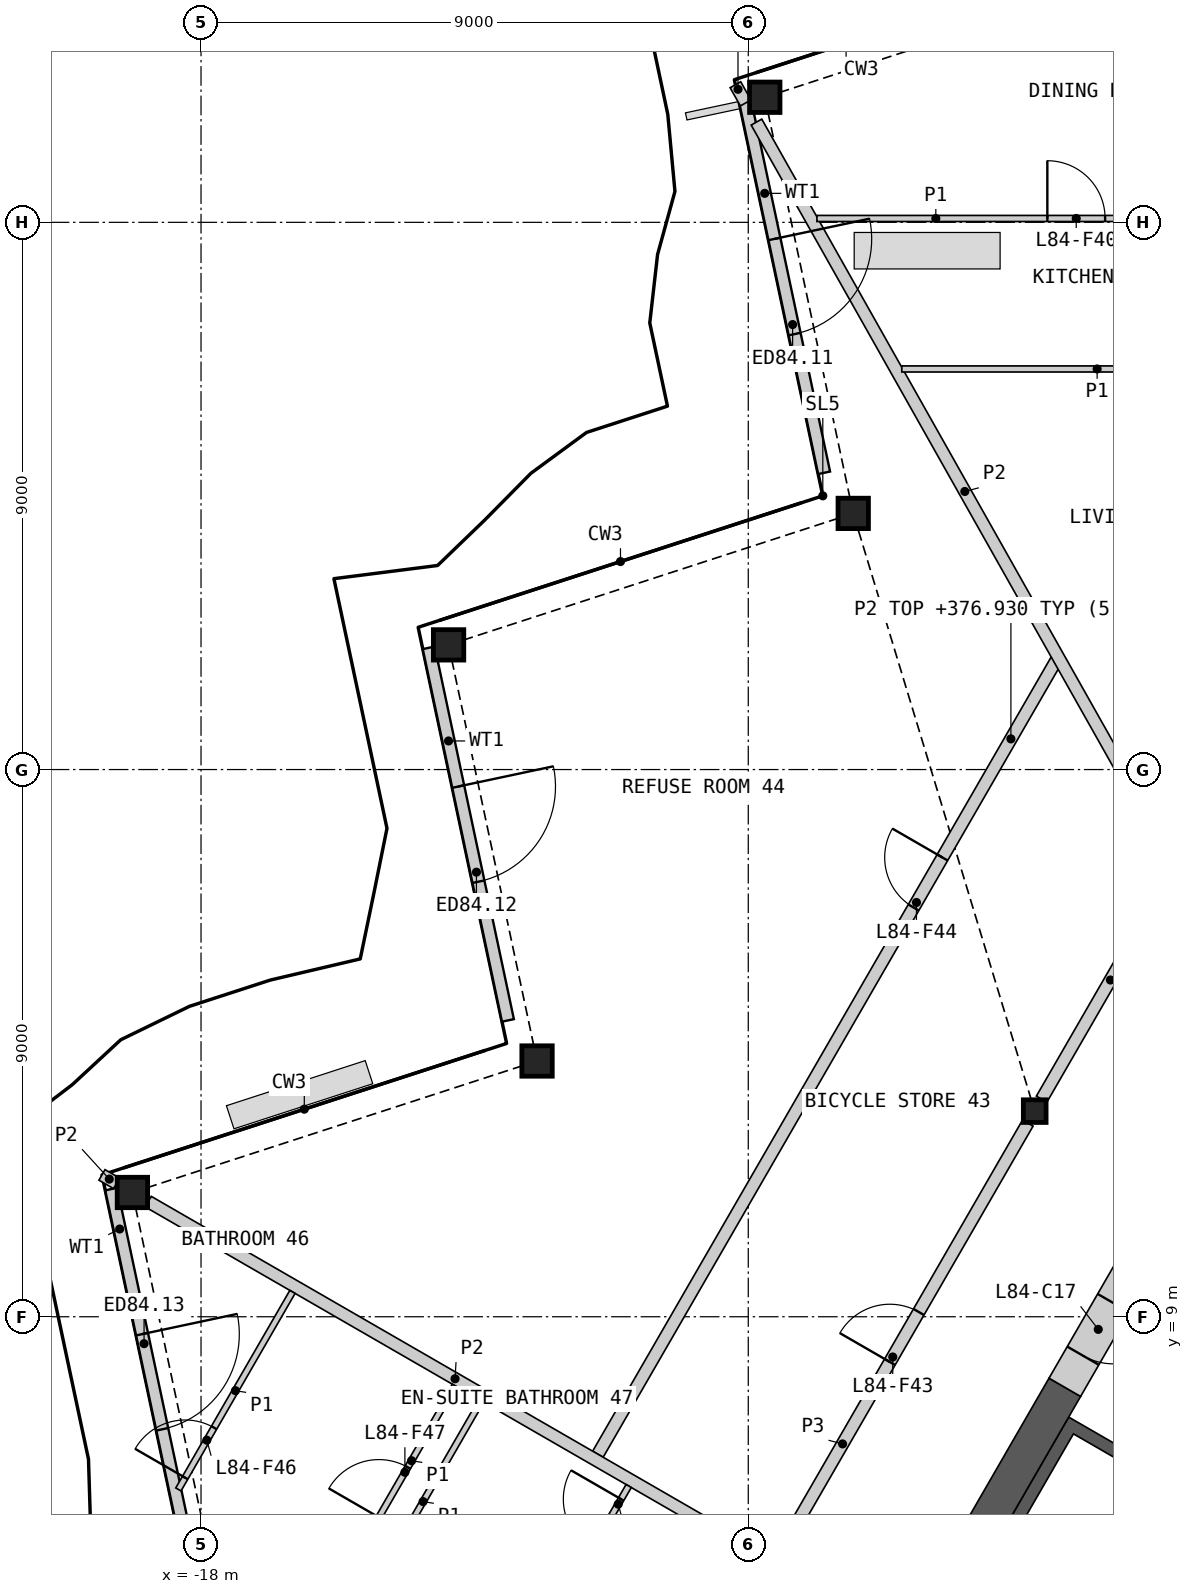
"""IFC4 building model, lengths in metres.
Left out: names, types, materials, properties, quantities, classifications, styles, units other than length and angle.
Written with IfcOpenShell. Run it as: python <this file> out.ifc"""

import sys

from ifc_helpers import new_model, si_unit, direction, frame, frame_2d, origin, origin_2d, place, context, subcontext, project, spatial, polyline, rectangle, hollow_rectangle, i_section, outline, extrude, element, fill, save


model = new_model("IFC4")
c1 = context("Model", 3, precision=1e-05, world=origin(), true_north=direction((0.0, 1.0)))
c2 = subcontext(c1, "Body", "Model", "MODEL_VIEW")
j1 = project(units=[si_unit("LENGTHUNIT", "METRE"), si_unit("PLANEANGLEUNIT", "RADIAN")], contexts=[c1])
p1 = place(None, origin())
s1 = spatial("IfcSite", under=j1, at=p1, CompositionType="ELEMENT")
p2 = place(p1, origin())
s2 = spatial("IfcBuilding", under=s1, at=p2, CompositionType="ELEMENT")
p3 = place(p2, frame((0.0, 0.0, 374.6)))
s3 = spatial("IfcBuildingStorey", under=s2, at=p3, CompositionType="ELEMENT", Elevation=374.6)
for number, where, z_axis, x_axis in (
    (1, (-8.729, 29.057, 0.0), (0.0, 0.0, 1.0), (1.0, 0.0, 0.0)),
    (2, (-7.274, 22.213, 0.0), (0.0, 0.0, 1.0), (1.0, 0.0, 0.0)),
    (3, (-13.929, 20.051, 0.0), (0.0, 0.0, 1.0), (1.0, 0.0, 0.0)),
    (4, (-12.474, 13.206, 0.0), (0.0, 0.0, 1.0), (1.0, 0.0, 0.0)),
    (5, (-19.129, 11.044, 0.0), (0.0, 0.0, 1.0), (1.0, 0.0, 0.0)),
):
    element("IfcColumn", number, at=place(p3, frame(where, z_axis=z_axis, x_axis=x_axis)), inside=s3, PredefinedType="COLUMN", context=c2, shape_type="SweptSolid", body=[
        extrude(hollow_rectangle(XDim=0.5, YDim=0.5, WallThickness=0.03, at=origin_2d()), origin(), (0.0, 0.0, 1.0), 3.4),
    ])
p4 = place(p3, frame((-4.289, 12.382, 0.0), z_axis=(0.0, 0.0, 1.0), x_axis=(1.0, 0.0, 0.0)))
e6 = element("IfcColumn", 6, at=p4, inside=s3, PredefinedType="COLUMN", context=c2, shape_type="SweptSolid", body=[
    extrude(i_section(OverallWidth=0.374, OverallDepth=0.372, WebThickness=0.016, FlangeThickness=0.026, at=origin_2d()), origin(), (0.0, 0.0, 1.0), 3.4),
])
p5 = place(p3, frame((-9.055, 29.009, 0.0), z_axis=(0.0, 0.0, 1.0), x_axis=(0.207926797195, -0.978144389652, 0.0)))
e7 = element("IfcWall", 7, at=p5, inside=s3, PredefinedType="SOLIDWALL", context=c2, shape_type="SweptSolid", body=[
    extrude(rectangle(XDim=6.265, YDim=0.2, at=frame_2d((3.133, 0.0))), origin(), (0.0, 0.0, 1.0), 2.634),
])
p6 = place(p5, frame((2.333, 0.0, 0.0)))
e8 = element("IfcOpeningElement", 8, at=p6, cuts=e7, PredefinedType="OPENING", context=c2, shape_type="SweptSolid", body=[
    extrude(rectangle(XDim=1.6, YDim=2.25, at=frame_2d((0.8, 1.125))), frame((0.0, 0.11, 0.0), z_axis=(0.0, -1.0, 0.0), x_axis=(1.0, 0.0, 0.0)), (0.0, 0.0, 1.0), 0.22),
])
p7 = place(p3, frame((-14.255, 20.002, 0.0), z_axis=(0.0, 0.0, 1.0), x_axis=(0.207926797195, -0.978144389652, 0.0)))
e9 = element("IfcWall", 9, at=p7, inside=s3, PredefinedType="SOLIDWALL", context=c2, shape_type="SweptSolid", body=[
    extrude(rectangle(XDim=6.265, YDim=0.2, at=frame_2d((3.133, 0.0))), origin(), (0.0, 0.0, 1.0), 2.634),
])
p8 = place(p7, frame((2.333, 0.0, 0.0)))
e10 = element("IfcOpeningElement", 10, at=p8, cuts=e9, PredefinedType="OPENING", context=c2, shape_type="SweptSolid", body=[
    extrude(rectangle(XDim=1.6, YDim=2.25, at=frame_2d((0.8, 1.125))), frame((0.0, 0.11, 0.0), z_axis=(0.0, -1.0, 0.0), x_axis=(1.0, 0.0, 0.0)), (0.0, 0.0, 1.0), 0.22),
])
p9 = place(p3, frame((-19.477, 11.1, 0.0), z_axis=(0.0, 0.0, 1.0), x_axis=(0.207910061304, -0.978147947096, 0.0)))
e11 = element("IfcWall", 11, at=p9, inside=s3, PredefinedType="SOLIDWALL", context=c2, shape_type="SweptSolid", body=[
    extrude(rectangle(XDim=6.716, YDim=0.2, at=frame_2d((3.358, 0.0))), origin(), (0.0, 0.0, 1.0), 2.634),
])
p10 = place(p9, frame((2.439, 0.0, 0.0)))
e12 = element("IfcOpeningElement", 12, at=p10, cuts=e11, PredefinedType="OPENING", context=c2, shape_type="SweptSolid", body=[
    extrude(rectangle(XDim=1.6, YDim=2.25, at=frame_2d((0.8, 1.125))), frame((0.0, 0.11, 0.0), z_axis=(0.0, -1.0, 0.0), x_axis=(1.0, 0.0, 0.0)), (0.0, 0.0, 1.0), 0.22),
])
p11 = place(p3, origin())
e13 = element("IfcWall", 13, at=p11, inside=s3, PredefinedType="SHEAR", context=c2, shape_type="SweptSolid", body=[
    extrude(outline(polyline([(-4.96, 0.208), (-7.131, 1.461), (-3.731, 7.35), (-1.561, 6.097), (-1.66, 5.924), (-3.652, 7.074), (-6.852, 1.531), (-4.861, 0.381), (-4.96, 0.208)])), origin(), (0.0, 0.0, 1.0), 3.1),
])
p12 = place(p3, frame((-1.631, 5.776, 0.0), z_axis=(0.0, 0.0, 1.0), x_axis=(-0.499992876559, -0.866029516466, 0.0)))
e14 = element("IfcWall", 14, at=p12, inside=s3, PredefinedType="SOLIDWALL", context=c2, shape_type="SweptSolid", body=[
    extrude(rectangle(XDim=6.486, YDim=0.2, at=frame_2d((3.243, 0.0))), origin(), (0.0, 0.0, 1.0), 3.1),
])
p13 = place(p12, frame((2.637, 0.0, 0.0)))
e15 = element("IfcOpeningElement", 15, at=p13, cuts=e14, PredefinedType="OPENING", context=c2, shape_type="SweptSolid", body=[
    extrude(rectangle(XDim=0.9, YDim=2.1, at=frame_2d((0.45, 1.05))), frame((0.0, 0.11, 0.0), z_axis=(0.0, -1.0, 0.0), x_axis=(1.0, 0.0, 0.0)), (0.0, 0.0, 1.0), 0.22),
])
p14 = place(p3, frame((-3.794, 7.84, 0.0), z_axis=(0.0, 0.0, 1.0), x_axis=(-0.499974747889, -0.866039982607, 0.0)))
e16 = element("IfcWall", 16, at=p14, inside=s3, PredefinedType="SHEAR", context=c2, shape_type="SweptSolid", body=[
    extrude(rectangle(XDim=7.092, YDim=0.6, at=frame_2d((3.546, 0.0))), origin(), (0.0, 0.0, 1.0), 3.1),
])
p15 = place(p3, frame((-2.694, 9.745, 0.0), z_axis=(0.0, 0.0, 1.0), x_axis=(-0.50002983664, -0.866008176907, 0.0)))
e17 = element("IfcWall", 17, at=p15, inside=s3, PredefinedType="SHEAR", context=c2, shape_type="SweptSolid", body=[
    extrude(rectangle(XDim=2.2, YDim=0.6, at=frame_2d((1.1, 0.0))), origin(), (0.0, 0.0, 1.0), 3.1),
])
p16 = place(p15, frame((0.6, 0.0, 0.0)))
e18 = element("IfcOpeningElement", 18, at=p16, cuts=e17, PredefinedType="OPENING", context=c2, shape_type="SweptSolid", body=[
    extrude(rectangle(XDim=1.0, YDim=2.1, at=frame_2d((0.5, 1.05))), frame((0.0, 0.31, 0.0), z_axis=(0.0, -1.0, 0.0), x_axis=(1.0, 0.0, 0.0)), (0.0, 0.0, 1.0), 0.62),
])
p17 = place(p3, frame((-8.465, 5.15, 0.0), z_axis=(0.0, 0.0, 1.0), x_axis=(0.499992155518, 0.866029932751, 0.0)))
e19 = element("IfcWall", 19, at=p17, inside=s3, PredefinedType="PARTITIONING", context=c2, shape_type="SweptSolid", body=[
    extrude(rectangle(XDim=8.123, YDim=0.2, at=frame_2d((4.062, 0.0))), origin(), (0.0, 0.0, 1.0), 3.1),
])
p18 = place(p17, frame((3.587, 0.0, 0.0)))
e20 = element("IfcOpeningElement", 20, at=p18, cuts=e19, PredefinedType="OPENING", context=c2, shape_type="SweptSolid", body=[
    extrude(rectangle(XDim=0.95, YDim=2.1, at=frame_2d((0.475, 1.05))), frame((0.0, 0.11, 0.0), z_axis=(0.0, -1.0, 0.0), x_axis=(1.0, 0.0, 0.0)), (0.0, 0.0, 1.0), 0.22),
])
p19 = place(p3, frame((-4.176, 12.579, 0.0), z_axis=(0.0, 0.0, 1.0), x_axis=(0.499974648164, 0.866040040179, 0.0)))
e21 = element("IfcWall", 21, at=p19, inside=s3, PredefinedType="PARTITIONING", context=c2, shape_type="SweptSolid", body=[
    extrude(rectangle(XDim=4.525, YDim=0.2, at=frame_2d((2.263, 0.0))), origin(), (0.0, 0.0, 1.0), 3.1),
])
p20 = place(p3, frame((-11.473, 6.74, 0.0), z_axis=(0.0, 0.0, 1.0), x_axis=(0.500001082559, 0.866024778768, 0.0)))
e22 = element("IfcWall", 22, at=p20, inside=s3, PredefinedType="PARTITIONING", context=c2, shape_type="SweptSolid", body=[
    extrude(rectangle(XDim=15.094, YDim=0.2, at=frame_2d((7.547, 0.0))), origin(), (0.0, 0.0, 1.0), 2.33),
])
p21 = place(p20, frame((10.383, 0.0, 0.0)))
e23 = element("IfcOpeningElement", 23, at=p21, cuts=e22, PredefinedType="OPENING", context=c2, shape_type="SweptSolid", body=[
    extrude(rectangle(XDim=0.95, YDim=2.1, at=frame_2d((0.475, 1.05))), frame((0.0, 0.11, 0.0), z_axis=(0.0, -1.0, 0.0), x_axis=(1.0, 0.0, 0.0)), (0.0, 0.0, 1.0), 0.22),
])
p22 = place(p3, frame((-8.865, 28.649, 0.0), z_axis=(0.0, 0.0, 1.0), x_axis=(0.491236420263, -0.871026279401, 0.0)))
e24 = element("IfcWall", 24, at=p22, inside=s3, PredefinedType="PARTITIONING", context=c2, shape_type="SweptSolid", body=[
    extrude(rectangle(XDim=13.95, YDim=0.2, at=frame_2d((6.975, 0.0))), origin(), (0.0, 0.0, 1.0), 2.33),
])
p23 = place(p3, frame((-18.869, 10.894, 0.0), z_axis=(0.0, 0.0, 1.0), x_axis=(0.866023724155, -0.500002909193, 0.0)))
e25 = element("IfcWall", 25, at=p23, inside=s3, PredefinedType="PARTITIONING", context=c2, shape_type="SweptSolid", body=[
    extrude(rectangle(XDim=11.655, YDim=0.2, at=frame_2d((5.827, 0.0))), origin(), (0.0, 0.0, 1.0), 2.33),
])
p24 = place(p3, frame((-9.211, 29.263, 0.0), z_axis=(0.0, 0.0, 1.0), x_axis=(0.4910719836, -0.871118996994, 0.0)))
e26 = element("IfcWall", 26, at=p24, inside=s3, PredefinedType="PARTITIONING", context=c2, shape_type="SweptSolid", body=[
    extrude(rectangle(XDim=0.343, YDim=0.2, at=frame_2d((0.171, 0.0))), origin(), (0.0, 0.0, 1.0), 2.33),
])
p25 = place(p3, frame((-19.629, 11.333, 0.0), z_axis=(0.0, 0.0, 1.0), x_axis=(0.866068339032, -0.499925626596, 0.0)))
e27 = element("IfcWall", 27, at=p25, inside=s3, PredefinedType="PARTITIONING", context=c2, shape_type="SweptSolid", body=[
    extrude(rectangle(XDim=0.277, YDim=0.2, at=frame_2d((0.139, 0.0))), origin(), (0.0, 0.0, 1.0), 2.33),
])
p26 = place(p3, frame((-7.871, 27.064, 0.0), z_axis=(0.0, 0.0, 1.0), x_axis=(1.0, 0.0, 0.0)))
e28 = element("IfcWall", 28, at=p26, inside=s3, PredefinedType="PARTITIONING", context=c2, shape_type="SweptSolid", body=[
    extrude(rectangle(XDim=7.821, YDim=0.1, at=frame_2d((3.91, 0.0))), origin(), (0.0, 0.0, 1.0), 2.33),
])
p27 = place(p26, frame((3.789, 0.0, 0.0)))
e29 = element("IfcOpeningElement", 29, at=p27, cuts=e28, PredefinedType="OPENING", context=c2, shape_type="SweptSolid", body=[
    extrude(rectangle(XDim=0.95, YDim=2.1, at=frame_2d((0.475, 1.05))), frame((0.0, 0.06, 0.0), z_axis=(0.0, -1.0, 0.0), x_axis=(1.0, 0.0, 0.0)), (0.0, 0.0, 1.0), 0.12),
])
p28 = place(p3, frame((-6.475, 24.589, 0.0), z_axis=(0.0, 0.0, 1.0), x_axis=(1.0, 0.0, 0.0)))
e30 = element("IfcWall", 30, at=p28, inside=s3, PredefinedType="PARTITIONING", context=c2, shape_type="SweptSolid", body=[
    extrude(rectangle(XDim=6.425, YDim=0.1, at=frame_2d((3.212, 0.0))), origin(), (0.0, 0.0, 1.0), 2.33),
])
p29 = place(p28, frame((3.499, 0.0, 0.0)))
e31 = element("IfcOpeningElement", 31, at=p29, cuts=e30, PredefinedType="OPENING", context=c2, shape_type="SweptSolid", body=[
    extrude(rectangle(XDim=0.95, YDim=2.1, at=frame_2d((0.475, 1.05))), frame((0.0, 0.06, 0.0), z_axis=(0.0, -1.0, 0.0), x_axis=(1.0, 0.0, 0.0)), (0.0, 0.0, 1.0), 0.12),
])
p30 = place(p3, frame((-18.372, 6.16, 0.0), z_axis=(0.0, 0.0, 1.0), x_axis=(0.499981580887, 0.866036037803, 0.0)))
e32 = element("IfcWall", 32, at=p30, inside=s3, PredefinedType="PARTITIONING", context=c2, shape_type="SweptSolid", body=[
    extrude(rectangle(XDim=3.752, YDim=0.1, at=frame_2d((1.876, 0.0))), origin(), (0.0, 0.0, 1.0), 2.33),
])
p31 = place(p30, frame((0.222, 0.0, 0.0)))
e33 = element("IfcOpeningElement", 33, at=p31, cuts=e32, PredefinedType="OPENING", context=c2, shape_type="SweptSolid", body=[
    extrude(rectangle(XDim=0.95, YDim=2.1, at=frame_2d((0.475, 1.05))), frame((0.0, 0.06, 0.0), z_axis=(0.0, -1.0, 0.0), x_axis=(1.0, 0.0, 0.0)), (0.0, 0.0, 1.0), 0.12),
])
p32 = place(p3, frame((-15.25, 5.398, 0.0), z_axis=(0.0, 0.0, 1.0), x_axis=(0.499935029643, 0.866062911188, 0.0)))
e34 = element("IfcWall", 34, at=p32, inside=s3, PredefinedType="PARTITIONING", context=c2, shape_type="SweptSolid", body=[
    extrude(rectangle(XDim=2.85, YDim=0.1, at=frame_2d((1.425, 0.0))), origin(), (0.0, 0.0, 1.0), 2.33),
])
p33 = place(p32, frame((0.35, 0.0, 0.0)))
e35 = element("IfcOpeningElement", 35, at=p33, cuts=e34, PredefinedType="OPENING", context=c2, shape_type="SweptSolid", body=[
    extrude(rectangle(XDim=0.95, YDim=2.1, at=frame_2d((0.475, 1.05))), frame((0.0, 0.06, 0.0), z_axis=(0.0, -1.0, 0.0), x_axis=(1.0, 0.0, 0.0)), (0.0, 0.0, 1.0), 0.12),
])
p34 = place(p3, frame((-12.242, 4.008, 0.0), z_axis=(0.0, 0.0, 1.0), x_axis=(0.499948979701, 0.866054858364, 0.0)))
e36 = element("IfcWall", 36, at=p34, inside=s3, PredefinedType="PARTITIONING", context=c2, shape_type="SweptSolid", body=[
    extrude(rectangle(XDim=2.55, YDim=0.1, at=frame_2d((1.275, 0.0))), origin(), (0.0, 0.0, 1.0), 2.33),
])
p35 = place(p34, frame((1.35, 0.0, 0.0)))
e37 = element("IfcOpeningElement", 37, at=p35, cuts=e36, PredefinedType="OPENING", context=c2, shape_type="SweptSolid", body=[
    extrude(rectangle(XDim=0.95, YDim=2.1, at=frame_2d((0.475, 1.05))), frame((0.0, 0.06, 0.0), z_axis=(0.0, -1.0, 0.0), x_axis=(1.0, 0.0, 0.0)), (0.0, 0.0, 1.0), 0.12),
])
p36 = place(p3, frame((-14.667, 5.408, 0.0), z_axis=(0.0, 0.0, 1.0), x_axis=(0.499948979701, 0.866054858364, 0.0)))
e38 = element("IfcWall", 38, at=p36, inside=s3, PredefinedType="PARTITIONING", context=c2, shape_type="SweptSolid", body=[
    extrude(rectangle(XDim=2.55, YDim=0.1, at=frame_2d((1.275, 0.0))), origin(), (0.0, 0.0, 1.0), 2.33),
])
p37 = place(p6, origin())
e39 = element("IfcDoor", 39, at=p37, inside=s3, OperationType="DOUBLE_DOOR_SINGLE_SWING", PredefinedType="DOOR", context=c2, shape_type="SweptSolid", body=[
    extrude(rectangle(XDim=1.6, YDim=2.25, at=frame_2d((0.8, 1.125))), frame((0.0, 0.025, 0.0), z_axis=(0.0, -1.0, 0.0), x_axis=(1.0, 0.0, 0.0)), (0.0, 0.0, 1.0), 0.05),
])
fill(e8, e39)
p38 = place(p8, origin())
e40 = element("IfcDoor", 40, at=p38, inside=s3, OperationType="DOUBLE_DOOR_SINGLE_SWING", PredefinedType="DOOR", context=c2, shape_type="SweptSolid", body=[
    extrude(rectangle(XDim=1.6, YDim=2.25, at=frame_2d((0.8, 1.125))), frame((0.0, 0.025, 0.0), z_axis=(0.0, -1.0, 0.0), x_axis=(1.0, 0.0, 0.0)), (0.0, 0.0, 1.0), 0.05),
])
fill(e10, e40)
p39 = place(p10, origin())
e41 = element("IfcDoor", 41, at=p39, inside=s3, OperationType="DOUBLE_DOOR_SINGLE_SWING", PredefinedType="DOOR", context=c2, shape_type="SweptSolid", body=[
    extrude(rectangle(XDim=1.6, YDim=2.25, at=frame_2d((0.8, 1.125))), frame((0.0, 0.025, 0.0), z_axis=(0.0, -1.0, 0.0), x_axis=(1.0, 0.0, 0.0)), (0.0, 0.0, 1.0), 0.05),
])
fill(e12, e41)
p40 = place(p16, origin())
e42 = element("IfcDoor", 42, at=p40, inside=s3, OperationType="SINGLE_SWING_LEFT", PredefinedType="DOOR", context=c2, shape_type="SweptSolid", body=[
    extrude(rectangle(XDim=1.0, YDim=2.1, at=frame_2d((0.5, 1.05))), frame((0.0, 0.055, 0.0), z_axis=(0.0, -1.0, 0.0), x_axis=(1.0, 0.0, 0.0)), (0.0, 0.0, 1.0), 0.05),
])
fill(e18, e42)
p41 = place(p27, origin())
e43 = element("IfcDoor", 43, at=p41, inside=s3, OperationType="SINGLE_SWING_LEFT", PredefinedType="DOOR", context=c2, shape_type="SweptSolid", body=[
    extrude(rectangle(XDim=0.95, YDim=2.1, at=frame_2d((0.475, 1.05))), frame((0.0, 0.025, 0.0), z_axis=(0.0, -1.0, 0.0), x_axis=(1.0, 0.0, 0.0)), (0.0, 0.0, 1.0), 0.05),
])
fill(e29, e43)
p42 = place(p18, origin())
e44 = element("IfcDoor", 44, at=p42, inside=s3, OperationType="SINGLE_SWING_LEFT", PredefinedType="DOOR", context=c2, shape_type="SweptSolid", body=[
    extrude(rectangle(XDim=0.95, YDim=2.1, at=frame_2d((0.475, 1.05))), frame((0.0, 0.025, 0.0), z_axis=(0.0, -1.0, 0.0), x_axis=(1.0, 0.0, 0.0)), (0.0, 0.0, 1.0), 0.05),
])
fill(e20, e44)
p43 = place(p21, origin())
e45 = element("IfcDoor", 45, at=p43, inside=s3, OperationType="SINGLE_SWING_RIGHT", PredefinedType="DOOR", context=c2, shape_type="SweptSolid", body=[
    extrude(rectangle(XDim=0.95, YDim=2.1, at=frame_2d((0.475, 1.05))), frame((0.0, 0.025, 0.0), z_axis=(0.0, -1.0, 0.0), x_axis=(1.0, 0.0, 0.0)), (0.0, 0.0, 1.0), 0.05),
])
fill(e23, e45)
p44 = place(p31, origin())
e46 = element("IfcDoor", 46, at=p44, inside=s3, OperationType="SINGLE_SWING_LEFT", PredefinedType="DOOR", context=c2, shape_type="SweptSolid", body=[
    extrude(rectangle(XDim=0.95, YDim=2.1, at=frame_2d((0.475, 1.05))), frame((0.0, 0.025, 0.0), z_axis=(0.0, -1.0, 0.0), x_axis=(1.0, 0.0, 0.0)), (0.0, 0.0, 1.0), 0.05),
])
fill(e33, e46)
p45 = place(p33, origin())
e47 = element("IfcDoor", 47, at=p45, inside=s3, OperationType="SINGLE_SWING_LEFT", PredefinedType="DOOR", context=c2, shape_type="SweptSolid", body=[
    extrude(rectangle(XDim=0.95, YDim=2.1, at=frame_2d((0.475, 1.05))), frame((0.0, 0.025, 0.0), z_axis=(0.0, -1.0, 0.0), x_axis=(1.0, 0.0, 0.0)), (0.0, 0.0, 1.0), 0.05),
])
fill(e35, e47)
p46 = place(p35, origin())
e48 = element("IfcDoor", 48, at=p46, inside=s3, OperationType="SINGLE_SWING_RIGHT", PredefinedType="DOOR", context=c2, shape_type="SweptSolid", body=[
    extrude(rectangle(XDim=0.95, YDim=2.1, at=frame_2d((0.475, 1.05))), frame((0.0, 0.025, 0.0), z_axis=(0.0, -1.0, 0.0), x_axis=(1.0, 0.0, 0.0)), (0.0, 0.0, 1.0), 0.05),
])
fill(e37, e48)
save(model, sys.argv[1])
